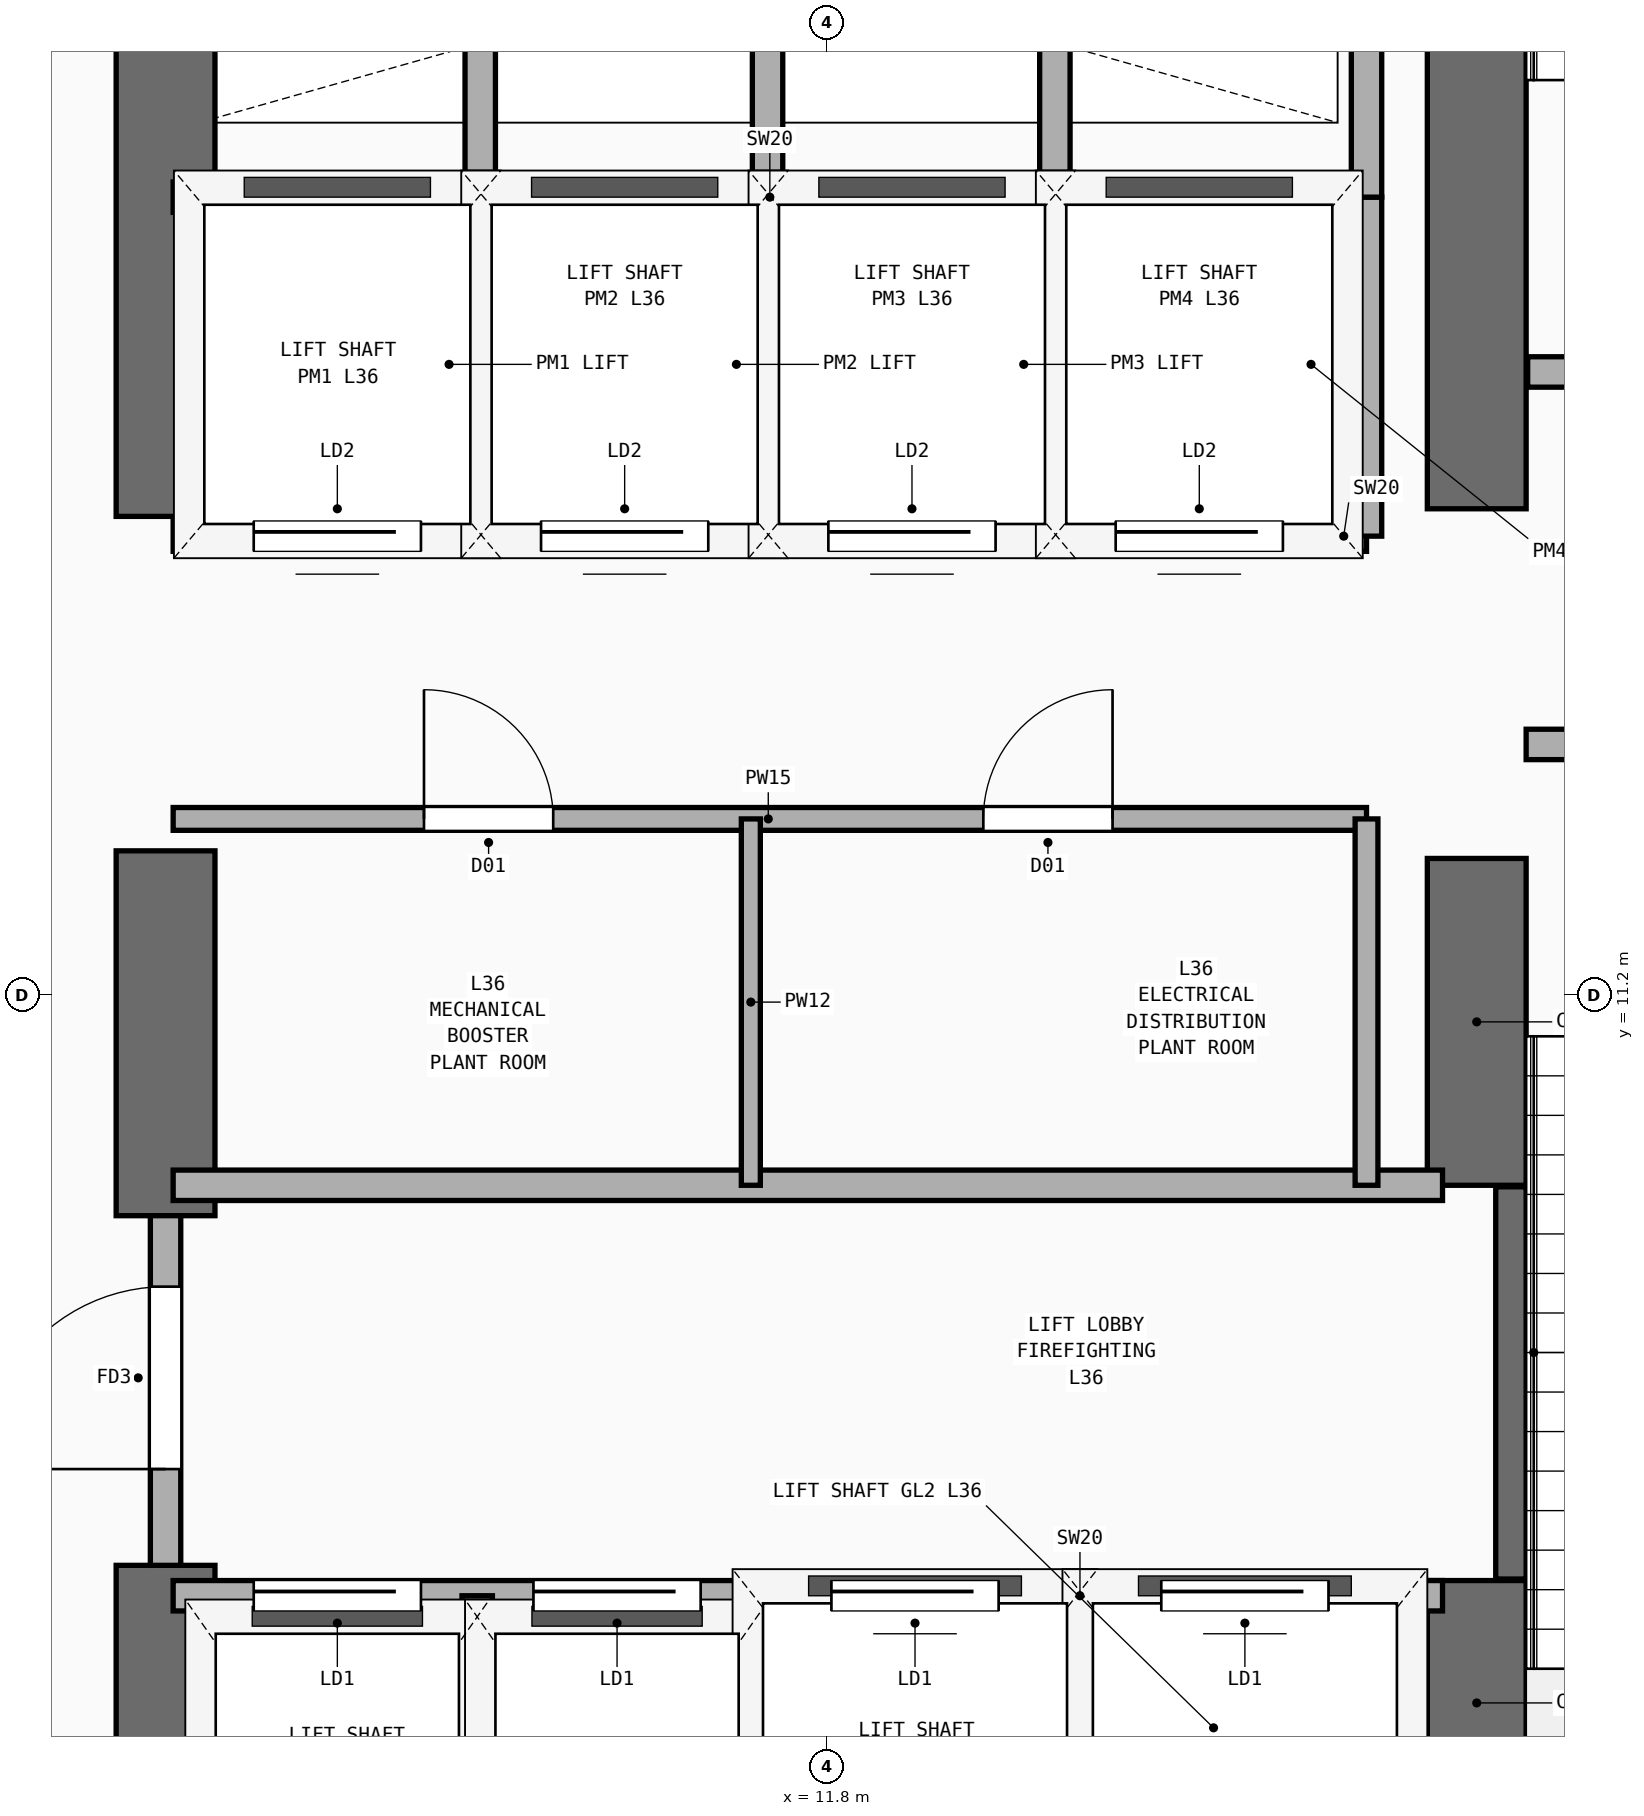
"""IFC4 building model, lengths in metres.
Left out: names, types, materials, properties, quantities, classifications, styles, units other than length and angle.
Written with IfcOpenShell. Run it as: python <this file> out.ifc"""

import sys

from ifc_helpers import new_model, si_unit, direction, frame, frame_2d, origin, place, context, subcontext, project, spatial, rectangle, extrude, element, fill, save


model = new_model("IFC4")
c1 = context("Model", 3, precision=1e-05, world=origin(), true_north=direction((0.0, 1.0)))
c2 = subcontext(c1, "Body", "Model", "MODEL_VIEW")
j1 = project(units=[si_unit("LENGTHUNIT", "METRE"), si_unit("PLANEANGLEUNIT", "RADIAN")], contexts=[c1])
p1 = place(None, origin())
s1 = spatial("IfcSite", under=j1, at=p1, CompositionType="ELEMENT")
p2 = place(p1, origin())
s2 = spatial("IfcBuilding", under=s1, at=p2, CompositionType="ELEMENT")
p3 = place(p2, frame((0.0, 0.0, 141.1)))
s3 = spatial("IfcBuildingStorey", under=s2, at=p3, CompositionType="ELEMENT", Elevation=141.1)
p4 = place(p3, frame((7.45, 4.65, 0.0), z_axis=(0.0, 0.0, 1.0), x_axis=(0.0, 1.0, 0.0)))
e1 = element("IfcWall", 1, at=p4, inside=s3, PredefinedType="SHEAR", context=c2, shape_type="SweptSolid", body=[
    extrude(rectangle(XDim=2.8, YDim=0.65, at=frame_2d((1.4, 0.0))), origin(), (0.0, 0.0, 1.0), 4.86),
])
p5 = place(p3, frame((7.45, 9.75, 0.0), z_axis=(0.0, 0.0, 1.0), x_axis=(0.0, 1.0, 0.0)))
e2 = element("IfcWall", 2, at=p5, inside=s3, PredefinedType="SHEAR", context=c2, shape_type="SweptSolid", body=[
    extrude(rectangle(XDim=2.4, YDim=0.65, at=frame_2d((1.2, 0.0))), origin(), (0.0, 0.0, 1.0), 4.86),
])
p6 = place(p3, frame((7.45, 14.35, 0.0), z_axis=(0.0, 0.0, 1.0), x_axis=(0.0, 1.0, 0.0)))
e3 = element("IfcWall", 3, at=p6, inside=s3, PredefinedType="SHEAR", context=c2, shape_type="SweptSolid", body=[
    extrude(rectangle(XDim=4.81, YDim=0.65, at=frame_2d((2.405, 0.0))), origin(), (0.0, 0.0, 1.0), 4.86),
])
p7 = place(p3, frame((16.075, 4.65, 0.0), z_axis=(0.0, 0.0, 1.0), x_axis=(0.0, 1.0, 0.0)))
e4 = element("IfcWall", 4, at=p7, inside=s3, PredefinedType="SHEAR", context=c2, shape_type="SweptSolid", body=[
    extrude(rectangle(XDim=2.7, YDim=0.65, at=frame_2d((1.35, 0.0))), origin(), (0.0, 0.0, 1.0), 4.86),
])
p8 = place(p3, frame((16.075, 9.95, 0.0), z_axis=(0.0, 0.0, 1.0), x_axis=(0.0, 1.0, 0.0)))
e5 = element("IfcWall", 5, at=p8, inside=s3, PredefinedType="SHEAR", context=c2, shape_type="SweptSolid", body=[
    extrude(rectangle(XDim=2.15, YDim=0.65, at=frame_2d((1.075, 0.0))), origin(), (0.0, 0.0, 1.0), 4.86),
])
p9 = place(p3, frame((16.075, 14.4, 0.0), z_axis=(0.0, 0.0, 1.0), x_axis=(0.0, 1.0, 0.0)))
e6 = element("IfcWall", 6, at=p9, inside=s3, PredefinedType="SHEAR", context=c2, shape_type="SweptSolid", body=[
    extrude(rectangle(XDim=9.1, YDim=0.65, at=frame_2d((4.55, 0.0))), origin(), (0.0, 0.0, 1.0), 4.86),
])
p10 = place(p3, frame((16.3, 7.36, 0.0), z_axis=(0.0, 0.0, 1.0), x_axis=(0.0, 1.0, 0.0)))
e7 = element("IfcWall", 7, at=p10, inside=s3, PredefinedType="SHEAR", context=c2, shape_type="SweptSolid", body=[
    extrude(rectangle(XDim=2.58, YDim=0.2, at=frame_2d((1.29, 0.0))), origin(), (0.0, 0.0, 1.0), 4.86),
])
p11 = place(p3, frame((16.4, 12.85, 0.0), z_axis=(0.0, 0.0, 1.0), x_axis=(1.0, 0.0, 0.0)))
e8 = element("IfcWall", 8, at=p11, inside=s3, PredefinedType="PARTITIONING", context=c2, shape_type="SweptSolid", body=[
    extrude(rectangle(XDim=3.96, YDim=0.2, at=frame_2d((1.98, 0.0))), origin(), (0.0, 0.0, 1.0), 4.86),
])
p12 = place(p11, frame((1.304, 0.0, 0.0)))
e9 = element("IfcOpeningElement", 9, at=p12, cuts=e8, PredefinedType="OPENING", context=c2, shape_type="SweptSolid", body=[
    extrude(rectangle(XDim=1.1, YDim=2.2, at=frame_2d((0.55, 1.1))), frame((0.0, 0.11, 0.0), z_axis=(0.0, -1.0, 0.0), x_axis=(1.0, 0.0, 0.0)), (0.0, 0.0, 1.0), 0.22),
])
p13 = place(p3, frame((16.41, 15.3, 0.0), z_axis=(0.0, 0.0, 1.0), x_axis=(1.0, 0.0, 0.0)))
e10 = element("IfcWall", 10, at=p13, inside=s3, PredefinedType="PARTITIONING", context=c2, shape_type="SweptSolid", body=[
    extrude(rectangle(XDim=3.95, YDim=0.2, at=frame_2d((1.975, 0.0))), origin(), (0.0, 0.0, 1.0), 4.86),
])
p14 = place(p13, frame((1.294, 0.0, 0.0)))
e11 = element("IfcOpeningElement", 11, at=p14, cuts=e10, PredefinedType="OPENING", context=c2, shape_type="SweptSolid", body=[
    extrude(rectangle(XDim=1.1, YDim=2.2, at=frame_2d((0.55, 1.1))), frame((0.0, 0.11, 0.0), z_axis=(0.0, -1.0, 0.0), x_axis=(1.0, 0.0, 0.0)), (0.0, 0.0, 1.0), 0.22),
])
p15 = place(p3, frame((7.5, 7.25, 0.0), z_axis=(0.0, 0.0, 1.0), x_axis=(1.0, 0.0, 0.0)))
e12 = element("IfcWall", 12, at=p15, inside=s3, PredefinedType="PARTITIONING", context=c2, shape_type="SweptSolid", body=[
    extrude(rectangle(XDim=8.35, YDim=0.2, at=frame_2d((4.175, 0.0))), origin(), (0.0, 0.0, 1.0), 4.86),
])
p16 = place(p15, frame((0.53, 0.0, 0.0)))
e13 = element("IfcOpeningElement", 13, at=p16, cuts=e12, PredefinedType="OPENING", context=c2, shape_type="SweptSolid", body=[
    extrude(rectangle(XDim=1.1, YDim=2.2, at=frame_2d((0.55, 1.1))), frame((0.0, 0.11, 0.0), z_axis=(0.0, -1.0, 0.0), x_axis=(1.0, 0.0, 0.0)), (0.0, 0.0, 1.0), 0.22),
])
p17 = place(p15, frame((2.37, 0.0, 0.0)))
e14 = element("IfcOpeningElement", 14, at=p17, cuts=e12, PredefinedType="OPENING", context=c2, shape_type="SweptSolid", body=[
    extrude(rectangle(XDim=1.1, YDim=2.2, at=frame_2d((0.55, 1.1))), frame((0.0, 0.11, 0.0), z_axis=(0.0, -1.0, 0.0), x_axis=(1.0, 0.0, 0.0)), (0.0, 0.0, 1.0), 0.22),
])
p18 = place(p15, frame((4.33, 0.0, 0.0)))
e15 = element("IfcOpeningElement", 15, at=p18, cuts=e12, PredefinedType="OPENING", context=c2, shape_type="SweptSolid", body=[
    extrude(rectangle(XDim=1.1, YDim=2.2, at=frame_2d((0.55, 1.1))), frame((0.0, 0.11, 0.0), z_axis=(0.0, -1.0, 0.0), x_axis=(1.0, 0.0, 0.0)), (0.0, 0.0, 1.0), 0.22),
])
p19 = place(p15, frame((6.5, 0.0, 0.0)))
e16 = element("IfcOpeningElement", 16, at=p19, cuts=e12, PredefinedType="OPENING", context=c2, shape_type="SweptSolid", body=[
    extrude(rectangle(XDim=1.1, YDim=2.2, at=frame_2d((0.55, 1.1))), frame((0.0, 0.11, 0.0), z_axis=(0.0, -1.0, 0.0), x_axis=(1.0, 0.0, 0.0)), (0.0, 0.0, 1.0), 0.22),
])
p20 = place(p3, frame((7.5, 9.95, 0.0), z_axis=(0.0, 0.0, 1.0), x_axis=(1.0, 0.0, 0.0)))
e17 = element("IfcWall", 17, at=p20, inside=s3, PredefinedType="PARTITIONING", context=c2, shape_type="SweptSolid", body=[
    extrude(rectangle(XDim=8.35, YDim=0.2, at=frame_2d((4.175, 0.0))), origin(), (0.0, 0.0, 1.0), 4.86),
])
for number, where, z_axis, x_axis in (
    (18, (9.5, 4.45, 0.0), (0.0, 0.0, 1.0), (0.0, 1.0, 0.0)),
    (19, (11.36, 4.45, 0.0), (0.0, 0.0, 1.0), (0.0, 1.0, 0.0)),
    (20, (13.46, 4.45, 0.0), (0.0, 0.0, 1.0), (0.0, 1.0, 0.0)),
):
    element("IfcWall", number, at=place(p3, frame(where, z_axis=z_axis, x_axis=x_axis)), inside=s3, PredefinedType="PARTITIONING", context=c2, shape_type="SweptSolid", body=[
        extrude(rectangle(XDim=2.8, YDim=0.2, at=frame_2d((1.4, 0.0))), origin(), (0.0, 0.0, 1.0), 4.86),
    ])
p21 = place(p3, frame((7.45, 7.45, 0.0), z_axis=(0.0, 0.0, 1.0), x_axis=(0.0, 1.0, 0.0)))
e21 = element("IfcWall", 21, at=p21, inside=s3, PredefinedType="PARTITIONING", context=c2, shape_type="SweptSolid", body=[
    extrude(rectangle(XDim=2.3, YDim=0.2, at=frame_2d((1.15, 0.0))), origin(), (0.0, 0.0, 1.0), 3.64),
])
p22 = place(p21, frame((0.633, 0.0, 0.0)))
e22 = element("IfcOpeningElement", 22, at=p22, cuts=e21, PredefinedType="OPENING", context=c2, shape_type="SweptSolid", body=[
    extrude(rectangle(XDim=1.2, YDim=2.25, at=frame_2d((0.6, 1.125))), frame((0.0, 0.11, 0.0), z_axis=(0.0, -1.0, 0.0), x_axis=(1.0, 0.0, 0.0)), (0.0, 0.0, 1.0), 0.22),
])
p23 = place(p3, frame((7.5, 12.36, 0.0), z_axis=(0.0, 0.0, 1.0), x_axis=(1.0, 0.0, 0.0)))
e23 = element("IfcWall", 23, at=p23, inside=s3, PredefinedType="PARTITIONING", context=c2, shape_type="SweptSolid", body=[
    extrude(rectangle(XDim=7.85, YDim=0.15, at=frame_2d((3.925, 0.0))), origin(), (0.0, 0.0, 1.0), 4.86),
])
p24 = place(p23, frame((1.65, 0.0, 0.0)))
e24 = element("IfcOpeningElement", 24, at=p24, cuts=e23, PredefinedType="OPENING", context=c2, shape_type="SweptSolid", body=[
    extrude(rectangle(XDim=0.85, YDim=2.15, at=frame_2d((0.425, 1.075))), frame((0.0, 0.085, 0.0), z_axis=(0.0, -1.0, 0.0), x_axis=(1.0, 0.0, 0.0)), (0.0, 0.0, 1.0), 0.17),
])
p25 = place(p23, frame((5.329, 0.0, 0.0)))
e25 = element("IfcOpeningElement", 25, at=p25, cuts=e23, PredefinedType="OPENING", context=c2, shape_type="SweptSolid", body=[
    extrude(rectangle(XDim=0.85, YDim=2.15, at=frame_2d((0.425, 1.075))), frame((0.0, 0.085, 0.0), z_axis=(0.0, -1.0, 0.0), x_axis=(1.0, 0.0, 0.0)), (0.0, 0.0, 1.0), 0.17),
])
p26 = place(p3, frame((15.35, 9.95, 0.0), z_axis=(0.0, 0.0, 1.0), x_axis=(0.0, 1.0, 0.0)))
e26 = element("IfcWall", 26, at=p26, inside=s3, PredefinedType="PARTITIONING", context=c2, shape_type="SweptSolid", body=[
    extrude(rectangle(XDim=2.41, YDim=0.15, at=frame_2d((1.205, 0.0))), origin(), (0.0, 0.0, 1.0), 4.86),
])
p27 = place(p3, frame((11.3, 9.95, 0.0), z_axis=(0.0, 0.0, 1.0), x_axis=(0.0, 1.0, 0.0)))
e27 = element("IfcWall", 27, at=p27, inside=s3, PredefinedType="PARTITIONING", context=c2, shape_type="SweptSolid", body=[
    extrude(rectangle(XDim=2.41, YDim=0.125, at=frame_2d((1.205, 0.0))), origin(), (0.0, 0.0, 1.0), 4.86),
])
p28 = place(p3, frame((7.5, 14.22, 0.0), z_axis=(0.0, 0.0, 1.0), x_axis=(1.0, 0.0, 0.0)))
e28 = element("IfcWall", 28, at=p28, inside=s3, PredefinedType="PARTITIONING", context=c2, shape_type="SweptSolid", body=[
    extrude(rectangle(XDim=7.85, YDim=0.2, at=frame_2d((3.925, 0.0))), origin(), (0.0, 0.0, 1.0), 4.86),
])
p29 = place(p28, frame((0.53, 0.0, 0.0)))
e29 = element("IfcOpeningElement", 29, at=p29, cuts=e28, PredefinedType="OPENING", context=c2, shape_type="SweptSolid", body=[
    extrude(rectangle(XDim=1.1, YDim=2.2, at=frame_2d((0.55, 1.1))), frame((0.0, 0.11, 0.0), z_axis=(0.0, -1.0, 0.0), x_axis=(1.0, 0.0, 0.0)), (0.0, 0.0, 1.0), 0.22),
])
p30 = place(p28, frame((2.42, 0.0, 0.0)))
e30 = element("IfcOpeningElement", 30, at=p30, cuts=e28, PredefinedType="OPENING", context=c2, shape_type="SweptSolid", body=[
    extrude(rectangle(XDim=1.1, YDim=2.2, at=frame_2d((0.55, 1.1))), frame((0.0, 0.11, 0.0), z_axis=(0.0, -1.0, 0.0), x_axis=(1.0, 0.0, 0.0)), (0.0, 0.0, 1.0), 0.22),
])
p31 = place(p28, frame((4.31, 0.0, 0.0)))
e31 = element("IfcOpeningElement", 31, at=p31, cuts=e28, PredefinedType="OPENING", context=c2, shape_type="SweptSolid", body=[
    extrude(rectangle(XDim=1.1, YDim=2.2, at=frame_2d((0.55, 1.1))), frame((0.0, 0.11, 0.0), z_axis=(0.0, -1.0, 0.0), x_axis=(1.0, 0.0, 0.0)), (0.0, 0.0, 1.0), 0.22),
])
p32 = place(p28, frame((6.2, 0.0, 0.0)))
e32 = element("IfcOpeningElement", 32, at=p32, cuts=e28, PredefinedType="OPENING", context=c2, shape_type="SweptSolid", body=[
    extrude(rectangle(XDim=1.1, YDim=2.2, at=frame_2d((0.55, 1.1))), frame((0.0, 0.11, 0.0), z_axis=(0.0, -1.0, 0.0), x_axis=(1.0, 0.0, 0.0)), (0.0, 0.0, 1.0), 0.22),
])
p33 = place(p3, frame((7.5, 16.45, 0.0), z_axis=(0.0, 0.0, 1.0), x_axis=(1.0, 0.0, 0.0)))
e33 = element("IfcWall", 33, at=p33, inside=s3, PredefinedType="PARTITIONING", context=c2, shape_type="SweptSolid", body=[
    extrude(rectangle(XDim=7.85, YDim=0.2, at=frame_2d((3.925, 0.0))), origin(), (0.0, 0.0, 1.0), 4.86),
])
for number, where, z_axis, x_axis in (
    (34, (15.35, 14.22, 0.0), (0.0, 0.0, 1.0), (0.0, 1.0, 0.0)),
    (35, (9.52, 14.22, 0.0), (0.0, 0.0, 1.0), (0.0, 1.0, 0.0)),
    (36, (11.41, 14.22, 0.0), (0.0, 0.0, 1.0), (0.0, 1.0, 0.0)),
    (37, (13.3, 14.22, 0.0), (0.0, 0.0, 1.0), (0.0, 1.0, 0.0)),
):
    element("IfcWall", number, at=place(p3, frame(where, z_axis=z_axis, x_axis=x_axis)), inside=s3, PredefinedType="PARTITIONING", context=c2, shape_type="SweptSolid", body=[
        extrude(rectangle(XDim=2.23, YDim=0.2, at=frame_2d((1.115, 0.0))), origin(), (0.0, 0.0, 1.0), 4.86),
    ])
for number, where, z_axis, x_axis in (
    (38, (15.35, 16.45, 0.0), (0.0, 0.0, 1.0), (0.0, 1.0, 0.0)),
    (39, (9.52, 16.45, 0.0), (0.0, 0.0, 1.0), (0.0, 1.0, 0.0)),
    (40, (11.41, 16.45, 0.0), (0.0, 0.0, 1.0), (0.0, 1.0, 0.0)),
    (41, (13.3, 16.45, 0.0), (0.0, 0.0, 1.0), (0.0, 1.0, 0.0)),
):
    element("IfcWall", number, at=place(p3, frame(where, z_axis=z_axis, x_axis=x_axis)), inside=s3, PredefinedType="PARTITIONING", context=c2, shape_type="SweptSolid", body=[
        extrude(rectangle(XDim=2.67, YDim=0.2, at=frame_2d((1.335, 0.0))), origin(), (0.0, 0.0, 1.0), 4.86),
    ])
p34 = place(p16, origin())
e42 = element("IfcDoor", 42, at=p34, inside=s3, OperationType="SLIDING_TO_LEFT", PredefinedType="DOOR", context=c2, shape_type="SweptSolid", body=[
    extrude(rectangle(XDim=1.1, YDim=2.2, at=frame_2d((0.55, 1.1))), frame((0.0, 0.025, 0.0), z_axis=(0.0, -1.0, 0.0), x_axis=(1.0, 0.0, 0.0)), (0.0, 0.0, 1.0), 0.05),
])
fill(e13, e42)
p35 = place(p17, origin())
e43 = element("IfcDoor", 43, at=p35, inside=s3, OperationType="SLIDING_TO_LEFT", PredefinedType="DOOR", context=c2, shape_type="SweptSolid", body=[
    extrude(rectangle(XDim=1.1, YDim=2.2, at=frame_2d((0.55, 1.1))), frame((0.0, 0.025, 0.0), z_axis=(0.0, -1.0, 0.0), x_axis=(1.0, 0.0, 0.0)), (0.0, 0.0, 1.0), 0.05),
])
fill(e14, e43)
p36 = place(p18, origin())
e44 = element("IfcDoor", 44, at=p36, inside=s3, OperationType="SLIDING_TO_LEFT", PredefinedType="DOOR", context=c2, shape_type="SweptSolid", body=[
    extrude(rectangle(XDim=1.1, YDim=2.2, at=frame_2d((0.55, 1.1))), frame((0.0, 0.025, 0.0), z_axis=(0.0, -1.0, 0.0), x_axis=(1.0, 0.0, 0.0)), (0.0, 0.0, 1.0), 0.05),
])
fill(e15, e44)
p37 = place(p19, origin())
e45 = element("IfcDoor", 45, at=p37, inside=s3, OperationType="SLIDING_TO_LEFT", PredefinedType="DOOR", context=c2, shape_type="SweptSolid", body=[
    extrude(rectangle(XDim=1.1, YDim=2.2, at=frame_2d((0.55, 1.1))), frame((0.0, 0.025, 0.0), z_axis=(0.0, -1.0, 0.0), x_axis=(1.0, 0.0, 0.0)), (0.0, 0.0, 1.0), 0.05),
])
fill(e16, e45)
p38 = place(p22, frame((1.2, 0.0, 0.0), z_axis=(0.0, 0.0, 1.0), x_axis=(-1.0, 0.0, 0.0)))
e46 = element("IfcDoor", 46, at=p38, inside=s3, OperationType="SINGLE_SWING_RIGHT", PredefinedType="DOOR", context=c2, shape_type="SweptSolid", body=[
    extrude(rectangle(XDim=1.2, YDim=2.25, at=frame_2d((0.6, 1.125))), frame((0.0, 0.025, 0.0), z_axis=(0.0, -1.0, 0.0), x_axis=(1.0, 0.0, 0.0)), (0.0, 0.0, 1.0), 0.05),
])
fill(e22, e46)
p39 = place(p24, origin())
e47 = element("IfcDoor", 47, at=p39, inside=s3, OperationType="SINGLE_SWING_LEFT", PredefinedType="DOOR", context=c2, shape_type="SweptSolid", body=[
    extrude(rectangle(XDim=0.85, YDim=2.15, at=frame_2d((0.425, 1.075))), frame((0.0, 0.025, 0.0), z_axis=(0.0, -1.0, 0.0), x_axis=(1.0, 0.0, 0.0)), (0.0, 0.0, 1.0), 0.05),
])
fill(e24, e47)
p40 = place(p25, origin())
e48 = element("IfcDoor", 48, at=p40, inside=s3, OperationType="SINGLE_SWING_RIGHT", PredefinedType="DOOR", context=c2, shape_type="SweptSolid", body=[
    extrude(rectangle(XDim=0.85, YDim=2.15, at=frame_2d((0.425, 1.075))), frame((0.0, 0.025, 0.0), z_axis=(0.0, -1.0, 0.0), x_axis=(1.0, 0.0, 0.0)), (0.0, 0.0, 1.0), 0.05),
])
fill(e25, e48)
p41 = place(p29, frame((1.1, 0.0, 0.0), z_axis=(0.0, 0.0, 1.0), x_axis=(-1.0, 0.0, 0.0)))
e49 = element("IfcDoor", 49, at=p41, inside=s3, OperationType="SLIDING_TO_LEFT", PredefinedType="DOOR", context=c2, shape_type="SweptSolid", body=[
    extrude(rectangle(XDim=1.1, YDim=2.2, at=frame_2d((0.55, 1.1))), frame((0.0, 0.025, 0.0), z_axis=(0.0, -1.0, 0.0), x_axis=(1.0, 0.0, 0.0)), (0.0, 0.0, 1.0), 0.05),
])
fill(e29, e49)
p42 = place(p30, frame((1.1, 0.0, 0.0), z_axis=(0.0, 0.0, 1.0), x_axis=(-1.0, 0.0, 0.0)))
e50 = element("IfcDoor", 50, at=p42, inside=s3, OperationType="SLIDING_TO_LEFT", PredefinedType="DOOR", context=c2, shape_type="SweptSolid", body=[
    extrude(rectangle(XDim=1.1, YDim=2.2, at=frame_2d((0.55, 1.1))), frame((0.0, 0.025, 0.0), z_axis=(0.0, -1.0, 0.0), x_axis=(1.0, 0.0, 0.0)), (0.0, 0.0, 1.0), 0.05),
])
fill(e30, e50)
p43 = place(p31, frame((1.1, 0.0, 0.0), z_axis=(0.0, 0.0, 1.0), x_axis=(-1.0, 0.0, 0.0)))
e51 = element("IfcDoor", 51, at=p43, inside=s3, OperationType="SLIDING_TO_LEFT", PredefinedType="DOOR", context=c2, shape_type="SweptSolid", body=[
    extrude(rectangle(XDim=1.1, YDim=2.2, at=frame_2d((0.55, 1.1))), frame((0.0, 0.025, 0.0), z_axis=(0.0, -1.0, 0.0), x_axis=(1.0, 0.0, 0.0)), (0.0, 0.0, 1.0), 0.05),
])
fill(e31, e51)
p44 = place(p32, frame((1.1, 0.0, 0.0), z_axis=(0.0, 0.0, 1.0), x_axis=(-1.0, 0.0, 0.0)))
e52 = element("IfcDoor", 52, at=p44, inside=s3, OperationType="SLIDING_TO_LEFT", PredefinedType="DOOR", context=c2, shape_type="SweptSolid", body=[
    extrude(rectangle(XDim=1.1, YDim=2.2, at=frame_2d((0.55, 1.1))), frame((0.0, 0.025, 0.0), z_axis=(0.0, -1.0, 0.0), x_axis=(1.0, 0.0, 0.0)), (0.0, 0.0, 1.0), 0.05),
])
fill(e32, e52)
save(model, sys.argv[1])
